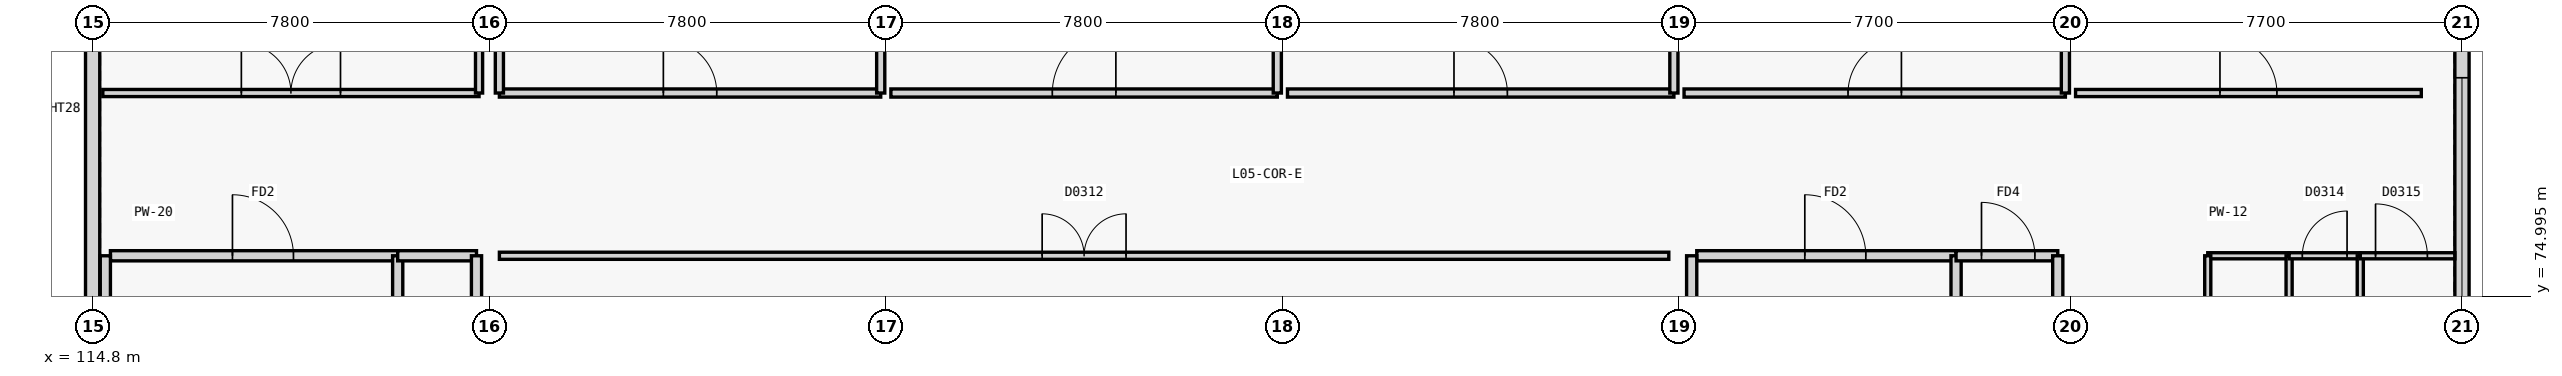
"""IFC4 building model, lengths in metres.
Left out: names, types, materials, properties, quantities, classifications, styles, units other than length and angle.
Written with IfcOpenShell. Run it as: python <this file> out.ifc"""

import sys

from ifc_helpers import new_model, si_unit, direction, frame, frame_2d, origin, place, context, subcontext, project, spatial, rectangle, extrude, element, fill, save


model = new_model("IFC4")
c1 = context("Model", 3, precision=1e-05, world=origin(), true_north=direction((0.0, 1.0)))
c2 = subcontext(c1, "Body", "Model", "MODEL_VIEW")
j1 = project(units=[si_unit("LENGTHUNIT", "METRE"), si_unit("PLANEANGLEUNIT", "RADIAN")], contexts=[c1])
p1 = place(None, origin())
s1 = spatial("IfcSite", under=j1, at=p1, CompositionType="ELEMENT")
p2 = place(p1, origin())
s2 = spatial("IfcBuilding", under=s1, at=p2, CompositionType="ELEMENT")
p3 = place(p2, frame((0.0, 0.0, 21.6)))
s3 = spatial("IfcBuildingStorey", under=s2, at=p3, CompositionType="ELEMENT", Elevation=21.6)
p4 = place(p3, frame((161.4, 96.777, 0.0), z_axis=(0.0, 0.0, 1.0), x_axis=(0.0, -1.0, 0.0)))
e1 = element("IfcWall", 1, at=p4, inside=s3, PredefinedType="SOLIDWALL", context=c2, shape_type="SweptSolid", body=[
    extrude(rectangle(XDim=32.554, YDim=0.28, at=frame_2d((16.277, 0.0))), origin(), (0.0, 0.0, 1.0), 1.98),
])
p5 = place(p4, frame((17.477, 0.0, 0.64)))
e2 = element("IfcOpeningElement", 2, at=p5, cuts=e1, PredefinedType="OPENING", context=c2, shape_type="SweptSolid", body=[
    extrude(rectangle(XDim=5.4, YDim=1.2, at=frame_2d((2.7, 0.6))), frame((0.0, 0.15, 0.0), z_axis=(0.0, -1.0, 0.0), x_axis=(1.0, 0.0, 0.0)), (0.0, 0.0, 1.0), 0.3),
])
p6 = place(p3, frame((114.8, 72.6, 0.0), z_axis=(0.0, 0.0, 1.0), x_axis=(0.0, 1.0, 0.0)))
e3 = element("IfcWall", 3, at=p6, inside=s3, PredefinedType="SOLIDWALL", context=c2, shape_type="SweptSolid", body=[
    extrude(rectangle(XDim=12.2, YDim=0.28, at=frame_2d((6.1, 0.0))), origin(), (0.0, 0.0, 1.0), 2.78),
])
p7 = place(p3, frame((115.15, 75.8, 0.0), z_axis=(0.0, 0.0, 1.0), x_axis=(1.0, 0.0, 0.0)))
e4 = element("IfcWall", 4, at=p7, inside=s3, PredefinedType="PARTITIONING", context=c2, shape_type="SweptSolid", body=[
    extrude(rectangle(XDim=5.65, YDim=0.2, at=frame_2d((2.825, 0.0))), origin(), (0.0, 0.0, 1.0), 3.32),
])
p8 = place(p7, frame((2.4, 0.0, 0.0)))
e5 = element("IfcOpeningElement", 5, at=p8, cuts=e4, PredefinedType="OPENING", context=c2, shape_type="SweptSolid", body=[
    extrude(rectangle(XDim=1.2, YDim=2.2, at=frame_2d((0.6, 1.1))), frame((0.0, 0.11, 0.0), z_axis=(0.0, -1.0, 0.0), x_axis=(1.0, 0.0, 0.0)), (0.0, 0.0, 1.0), 0.22),
])
p9 = place(p3, frame((115.05, 72.4, 0.0), z_axis=(0.0, 0.0, 1.0), x_axis=(0.0, 1.0, 0.0)))
e6 = element("IfcWall", 6, at=p9, inside=s3, PredefinedType="PARTITIONING", context=c2, shape_type="SweptSolid", body=[
    extrude(rectangle(XDim=3.4, YDim=0.2, at=frame_2d((1.7, 0.0))), origin(), (0.0, 0.0, 1.0), 2.78),
])
p10 = place(p3, frame((120.8, 72.4, 0.0), z_axis=(0.0, 0.0, 1.0), x_axis=(0.0, 1.0, 0.0)))
e7 = element("IfcWall", 7, at=p10, inside=s3, PredefinedType="PARTITIONING", context=c2, shape_type="SweptSolid", body=[
    extrude(rectangle(XDim=3.4, YDim=0.2, at=frame_2d((1.7, 0.0))), origin(), (0.0, 0.0, 1.0), 3.32),
])
p11 = place(p10, frame((1.1, 0.0, 0.0)))
e8 = element("IfcOpeningElement", 8, at=p11, cuts=e7, PredefinedType="OPENING", context=c2, shape_type="SweptSolid", body=[
    extrude(rectangle(XDim=1.2, YDim=2.2, at=frame_2d((0.6, 1.1))), frame((0.0, 0.11, 0.0), z_axis=(0.0, -1.0, 0.0), x_axis=(1.0, 0.0, 0.0)), (0.0, 0.0, 1.0), 0.22),
])
p12 = place(p3, frame((120.8, 75.8, 0.0), z_axis=(0.0, 0.0, 1.0), x_axis=(1.0, 0.0, 0.0)))
e9 = element("IfcWall", 9, at=p12, inside=s3, PredefinedType="PARTITIONING", context=c2, shape_type="SweptSolid", body=[
    extrude(rectangle(XDim=1.55, YDim=0.2, at=frame_2d((0.775, 0.0))), origin(), (0.0, 0.0, 1.0), 3.32),
])
p13 = place(p3, frame((122.35, 72.4, 0.0), z_axis=(0.0, 0.0, 1.0), x_axis=(0.0, 1.0, 0.0)))
e10 = element("IfcWall", 10, at=p13, inside=s3, PredefinedType="PARTITIONING", context=c2, shape_type="SweptSolid", body=[
    extrude(rectangle(XDim=3.4, YDim=0.2, at=frame_2d((1.7, 0.0))), origin(), (0.0, 0.0, 1.0), 2.82),
])
p14 = place(p3, frame((146.35, 75.8, 0.0), z_axis=(0.0, 0.0, 1.0), x_axis=(1.0, 0.0, 0.0)))
e11 = element("IfcWall", 11, at=p14, inside=s3, PredefinedType="PARTITIONING", context=c2, shape_type="SweptSolid", body=[
    extrude(rectangle(XDim=5.1, YDim=0.2, at=frame_2d((2.55, 0.0))), origin(), (0.0, 0.0, 1.0), 3.32),
])
p15 = place(p14, frame((2.125, 0.0, 0.0)))
e12 = element("IfcOpeningElement", 12, at=p15, cuts=e11, PredefinedType="OPENING", context=c2, shape_type="SweptSolid", body=[
    extrude(rectangle(XDim=1.2, YDim=2.2, at=frame_2d((0.6, 1.1))), frame((0.0, 0.11, 0.0), z_axis=(0.0, -1.0, 0.0), x_axis=(1.0, 0.0, 0.0)), (0.0, 0.0, 1.0), 0.22),
])
p16 = place(p3, frame((146.25, 72.4, 0.0), z_axis=(0.0, 0.0, 1.0), x_axis=(0.0, 1.0, 0.0)))
e13 = element("IfcWall", 13, at=p16, inside=s3, PredefinedType="PARTITIONING", context=c2, shape_type="SweptSolid", body=[
    extrude(rectangle(XDim=3.4, YDim=0.2, at=frame_2d((1.7, 0.0))), origin(), (0.0, 0.0, 1.0), 2.82),
])
p17 = place(p3, frame((151.45, 72.4, 0.0), z_axis=(0.0, 0.0, 1.0), x_axis=(0.0, 1.0, 0.0)))
e14 = element("IfcWall", 14, at=p17, inside=s3, PredefinedType="PARTITIONING", context=c2, shape_type="SweptSolid", body=[
    extrude(rectangle(XDim=3.4, YDim=0.2, at=frame_2d((1.7, 0.0))), origin(), (0.0, 0.0, 1.0), 3.32),
])
p18 = place(p17, frame((1.1, 0.0, 0.0)))
e15 = element("IfcOpeningElement", 15, at=p18, cuts=e14, PredefinedType="OPENING", context=c2, shape_type="SweptSolid", body=[
    extrude(rectangle(XDim=1.2, YDim=2.2, at=frame_2d((0.6, 1.1))), frame((0.0, 0.11, 0.0), z_axis=(0.0, -1.0, 0.0), x_axis=(1.0, 0.0, 0.0)), (0.0, 0.0, 1.0), 0.22),
])
p19 = place(p3, frame((151.45, 75.8, 0.0), z_axis=(0.0, 0.0, 1.0), x_axis=(1.0, 0.0, 0.0)))
e16 = element("IfcWall", 16, at=p19, inside=s3, PredefinedType="PARTITIONING", context=c2, shape_type="SweptSolid", body=[
    extrude(rectangle(XDim=2.0, YDim=0.2, at=frame_2d((1.0, 0.0))), origin(), (0.0, 0.0, 1.0), 3.32),
])
p20 = place(p19, frame((0.5, 0.0, 0.0)))
e17 = element("IfcOpeningElement", 17, at=p20, cuts=e16, PredefinedType="OPENING", context=c2, shape_type="SweptSolid", body=[
    extrude(rectangle(XDim=1.05, YDim=2.15, at=frame_2d((0.525, 1.075))), frame((0.0, 0.11, 0.0), z_axis=(0.0, -1.0, 0.0), x_axis=(1.0, 0.0, 0.0)), (0.0, 0.0, 1.0), 0.22),
])
p21 = place(p3, frame((153.45, 72.4, 0.0), z_axis=(0.0, 0.0, 1.0), x_axis=(0.0, 1.0, 0.0)))
e18 = element("IfcWall", 18, at=p21, inside=s3, PredefinedType="PARTITIONING", context=c2, shape_type="SweptSolid", body=[
    extrude(rectangle(XDim=3.4, YDim=0.2, at=frame_2d((1.7, 0.0))), origin(), (0.0, 0.0, 1.0), 2.82),
])
p22 = place(p3, frame((115.0, 79.0, 0.0), z_axis=(0.0, 0.0, 1.0), x_axis=(1.0, 0.0, 0.0)))
e19 = element("IfcWall", 19, at=p22, inside=s3, PredefinedType="PARTITIONING", context=c2, shape_type="SweptSolid", body=[
    extrude(rectangle(XDim=7.4, YDim=0.14, at=frame_2d((3.7, 0.0))), origin(), (0.0, 0.0, 1.0), 3.34),
])
p23 = place(p22, frame((2.725, 0.0, 0.0)))
e20 = element("IfcOpeningElement", 20, at=p23, cuts=e19, PredefinedType="OPENING", context=c2, shape_type="SweptSolid", body=[
    extrude(rectangle(XDim=1.95, YDim=2.35, at=frame_2d((0.975, 1.175))), frame((0.0, 0.08, 0.0), z_axis=(0.0, -1.0, 0.0), x_axis=(1.0, 0.0, 0.0)), (0.0, 0.0, 1.0), 0.16),
])
p24 = place(p3, frame((122.4, 79.0, 0.0), z_axis=(0.0, 0.0, 1.0), x_axis=(0.0, 1.0, 0.0)))
e21 = element("IfcWall", 21, at=p24, inside=s3, PredefinedType="PARTITIONING", context=c2, shape_type="SweptSolid", body=[
    extrude(rectangle(XDim=5.4, YDim=0.14, at=frame_2d((2.7, 0.0))), origin(), (0.0, 0.0, 1.0), 1.98),
])
p25 = place(p3, frame((122.8, 75.8, 0.0), z_axis=(0.0, 0.0, 1.0), x_axis=(1.0, 0.0, 0.0)))
e22 = element("IfcWall", 22, at=p25, inside=s3, PredefinedType="PARTITIONING", context=c2, shape_type="SweptSolid", body=[
    extrude(rectangle(XDim=23.0, YDim=0.14, at=frame_2d((11.5, 0.0))), origin(), (0.0, 0.0, 1.0), 3.34),
])
p26 = place(p25, frame((10.675, 0.0, 0.0)))
e23 = element("IfcOpeningElement", 23, at=p26, cuts=e22, PredefinedType="OPENING", context=c2, shape_type="SweptSolid", body=[
    extrude(rectangle(XDim=1.65, YDim=2.3, at=frame_2d((0.825, 1.15))), frame((0.0, 0.08, 0.0), z_axis=(0.0, -1.0, 0.0), x_axis=(1.0, 0.0, 0.0)), (0.0, 0.0, 1.0), 0.16),
])
p27 = place(p3, frame((156.4, 75.8, 0.0), z_axis=(0.0, 0.0, 1.0), x_axis=(1.0, 0.0, 0.0)))
e24 = element("IfcWall", 24, at=p27, inside=s3, PredefinedType="PARTITIONING", context=c2, shape_type="SweptSolid", body=[
    extrude(rectangle(XDim=1.6, YDim=0.12, at=frame_2d((0.8, 0.0))), origin(), (0.0, 0.0, 1.0), 3.34),
])
p28 = place(p3, frame((156.4, 70.6, 0.0), z_axis=(0.0, 0.0, 1.0), x_axis=(0.0, 1.0, 0.0)))
e25 = element("IfcWall", 25, at=p28, inside=s3, PredefinedType="PARTITIONING", context=c2, shape_type="SweptSolid", body=[
    extrude(rectangle(XDim=5.2, YDim=0.12, at=frame_2d((2.6, 0.0))), origin(), (0.0, 0.0, 1.0), 3.34),
])
p29 = place(p28, frame((2.16, 0.0, 0.0)))
e26 = element("IfcOpeningElement", 26, at=p29, cuts=e25, PredefinedType="OPENING", context=c2, shape_type="SweptSolid", body=[
    extrude(rectangle(XDim=0.88, YDim=2.1, at=frame_2d((0.44, 1.05))), frame((0.0, 0.07, 0.0), z_axis=(0.0, -1.0, 0.0), x_axis=(1.0, 0.0, 0.0)), (0.0, 0.0, 1.0), 0.14),
])
p30 = place(p3, frame((158.0, 70.6, 0.0), z_axis=(0.0, 0.0, 1.0), x_axis=(0.0, 1.0, 0.0)))
e27 = element("IfcWall", 27, at=p30, inside=s3, PredefinedType="PARTITIONING", context=c2, shape_type="SweptSolid", body=[
    extrude(rectangle(XDim=5.2, YDim=0.12, at=frame_2d((2.6, 0.0))), origin(), (0.0, 0.0, 1.0), 3.34),
])
p31 = place(p3, frame((158.0, 75.8, 0.0), z_axis=(0.0, 0.0, 1.0), x_axis=(1.0, 0.0, 0.0)))
e28 = element("IfcWall", 28, at=p31, inside=s3, PredefinedType="PARTITIONING", context=c2, shape_type="SweptSolid", body=[
    extrude(rectangle(XDim=1.4, YDim=0.12, at=frame_2d((0.7, 0.0))), origin(), (0.0, 0.0, 1.0), 3.34),
])
p32 = place(p31, frame((0.26, 0.0, 0.0)))
e29 = element("IfcOpeningElement", 29, at=p32, cuts=e28, PredefinedType="OPENING", context=c2, shape_type="SweptSolid", body=[
    extrude(rectangle(XDim=0.88, YDim=2.1, at=frame_2d((0.44, 1.05))), frame((0.0, 0.07, 0.0), z_axis=(0.0, -1.0, 0.0), x_axis=(1.0, 0.0, 0.0)), (0.0, 0.0, 1.0), 0.14),
])
p33 = place(p3, frame((159.4, 70.6, 0.0), z_axis=(0.0, 0.0, 1.0), x_axis=(0.0, 1.0, 0.0)))
e30 = element("IfcWall", 30, at=p33, inside=s3, PredefinedType="PARTITIONING", context=c2, shape_type="SweptSolid", body=[
    extrude(rectangle(XDim=5.2, YDim=0.12, at=frame_2d((2.6, 0.0))), origin(), (0.0, 0.0, 1.0), 3.34),
])
p34 = place(p3, frame((159.4, 75.8, 0.0), z_axis=(0.0, 0.0, 1.0), x_axis=(1.0, 0.0, 0.0)))
e31 = element("IfcWall", 31, at=p34, inside=s3, PredefinedType="PARTITIONING", context=c2, shape_type="SweptSolid", body=[
    extrude(rectangle(XDim=1.86, YDim=0.12, at=frame_2d((0.93, 0.0))), origin(), (0.0, 0.0, 1.0), 3.34),
])
p35 = place(p34, frame((0.3, 0.0, 0.0)))
e32 = element("IfcOpeningElement", 32, at=p35, cuts=e31, PredefinedType="OPENING", context=c2, shape_type="SweptSolid", body=[
    extrude(rectangle(XDim=1.02, YDim=2.1, at=frame_2d((0.51, 1.05))), frame((0.0, 0.07, 0.0), z_axis=(0.0, -1.0, 0.0), x_axis=(1.0, 0.0, 0.0)), (0.0, 0.0, 1.0), 0.14),
])
p36 = place(p3, frame((122.8, 79.0, 0.0), z_axis=(0.0, 0.0, 1.0), x_axis=(1.0, 0.0, 0.0)))
e33 = element("IfcWall", 33, at=p36, inside=s3, PredefinedType="PARTITIONING", context=c2, shape_type="SweptSolid", body=[
    extrude(rectangle(XDim=7.5, YDim=0.16, at=frame_2d((3.75, 0.0))), origin(), (0.0, 0.0, 1.0), 3.34),
])
p37 = place(p36, frame((3.225, 0.0, 0.0)))
e34 = element("IfcOpeningElement", 34, at=p37, cuts=e33, PredefinedType="OPENING", context=c2, shape_type="SweptSolid", body=[
    extrude(rectangle(XDim=1.05, YDim=2.15, at=frame_2d((0.525, 1.075))), frame((0.0, 0.09, 0.0), z_axis=(0.0, -1.0, 0.0), x_axis=(1.0, 0.0, 0.0)), (0.0, 0.0, 1.0), 0.18),
])
for number, where, z_axis, x_axis in (
    (35, (122.8, 79.0, 0.0), (0.0, 0.0, 1.0), (0.0, 1.0, 0.0)),
    (36, (130.3, 79.0, 0.0), (0.0, 0.0, 1.0), (0.0, 1.0, 0.0)),
):
    element("IfcWall", number, at=place(p3, frame(where, z_axis=z_axis, x_axis=x_axis)), inside=s3, PredefinedType="PARTITIONING", context=c2, shape_type="SweptSolid", body=[
        extrude(rectangle(XDim=17.6, YDim=0.16, at=frame_2d((8.8, 0.0))), origin(), (0.0, 0.0, 1.0), 1.98),
    ])
p38 = place(p3, frame((130.5, 79.0, 0.0), z_axis=(0.0, 0.0, 1.0), x_axis=(1.0, 0.0, 0.0)))
e37 = element("IfcWall", 37, at=p38, inside=s3, PredefinedType="PARTITIONING", context=c2, shape_type="SweptSolid", body=[
    extrude(rectangle(XDim=7.6, YDim=0.16, at=frame_2d((3.8, 0.0))), origin(), (0.0, 0.0, 1.0), 3.34),
])
p39 = place(p38, frame((3.175, 0.0, 0.0)))
e38 = element("IfcOpeningElement", 38, at=p39, cuts=e37, PredefinedType="OPENING", context=c2, shape_type="SweptSolid", body=[
    extrude(rectangle(XDim=1.25, YDim=2.2, at=frame_2d((0.625, 1.1))), frame((0.0, 0.09, 0.0), z_axis=(0.0, -1.0, 0.0), x_axis=(1.0, 0.0, 0.0)), (0.0, 0.0, 1.0), 0.18),
])
p40 = place(p3, frame((138.1, 79.0, 0.0), z_axis=(0.0, 0.0, 1.0), x_axis=(0.0, 1.0, 0.0)))
e39 = element("IfcWall", 39, at=p40, inside=s3, PredefinedType="PARTITIONING", context=c2, shape_type="SweptSolid", body=[
    extrude(rectangle(XDim=17.6, YDim=0.16, at=frame_2d((8.8, 0.0))), origin(), (0.0, 0.0, 1.0), 1.98),
])
p41 = place(p3, frame((138.3, 79.0, 0.0), z_axis=(0.0, 0.0, 1.0), x_axis=(1.0, 0.0, 0.0)))
e40 = element("IfcWall", 40, at=p41, inside=s3, PredefinedType="PARTITIONING", context=c2, shape_type="SweptSolid", body=[
    extrude(rectangle(XDim=7.6, YDim=0.16, at=frame_2d((3.8, 0.0))), origin(), (0.0, 0.0, 1.0), 3.34),
])
p42 = place(p41, frame((3.275, 0.0, 0.0)))
e41 = element("IfcOpeningElement", 41, at=p42, cuts=e40, PredefinedType="OPENING", context=c2, shape_type="SweptSolid", body=[
    extrude(rectangle(XDim=1.05, YDim=2.15, at=frame_2d((0.525, 1.075))), frame((0.0, 0.09, 0.0), z_axis=(0.0, -1.0, 0.0), x_axis=(1.0, 0.0, 0.0)), (0.0, 0.0, 1.0), 0.18),
])
p43 = place(p3, frame((145.9, 79.0, 0.0), z_axis=(0.0, 0.0, 1.0), x_axis=(0.0, 1.0, 0.0)))
e42 = element("IfcWall", 42, at=p43, inside=s3, PredefinedType="PARTITIONING", context=c2, shape_type="SweptSolid", body=[
    extrude(rectangle(XDim=17.6, YDim=0.16, at=frame_2d((8.8, 0.0))), origin(), (0.0, 0.0, 1.0), 1.98),
])
p44 = place(p3, frame((146.1, 79.0, 0.0), z_axis=(0.0, 0.0, 1.0), x_axis=(1.0, 0.0, 0.0)))
e43 = element("IfcWall", 43, at=p44, inside=s3, PredefinedType="PARTITIONING", context=c2, shape_type="SweptSolid", body=[
    extrude(rectangle(XDim=7.5, YDim=0.16, at=frame_2d((3.75, 0.0))), origin(), (0.0, 0.0, 1.0), 3.34),
])
p45 = place(p44, frame((3.225, 0.0, 0.0)))
e44 = element("IfcOpeningElement", 44, at=p45, cuts=e43, PredefinedType="OPENING", context=c2, shape_type="SweptSolid", body=[
    extrude(rectangle(XDim=1.05, YDim=2.15, at=frame_2d((0.525, 1.075))), frame((0.0, 0.09, 0.0), z_axis=(0.0, -1.0, 0.0), x_axis=(1.0, 0.0, 0.0)), (0.0, 0.0, 1.0), 0.18),
])
p46 = place(p3, frame((153.6, 79.0, 0.0), z_axis=(0.0, 0.0, 1.0), x_axis=(0.0, 1.0, 0.0)))
e45 = element("IfcWall", 45, at=p46, inside=s3, PredefinedType="PARTITIONING", context=c2, shape_type="SweptSolid", body=[
    extrude(rectangle(XDim=17.6, YDim=0.16, at=frame_2d((8.8, 0.0))), origin(), (0.0, 0.0, 1.0), 1.98),
])
p47 = place(p3, frame((153.8, 79.0, 0.0), z_axis=(0.0, 0.0, 1.0), x_axis=(1.0, 0.0, 0.0)))
e46 = element("IfcWall", 46, at=p47, inside=s3, PredefinedType="PARTITIONING", context=c2, shape_type="SweptSolid", body=[
    extrude(rectangle(XDim=6.8, YDim=0.14, at=frame_2d((3.4, 0.0))), origin(), (0.0, 0.0, 1.0), 3.34),
])
p48 = place(p47, frame((2.84, 0.0, 0.0)))
e47 = element("IfcOpeningElement", 47, at=p48, cuts=e46, PredefinedType="OPENING", context=c2, shape_type="SweptSolid", body=[
    extrude(rectangle(XDim=1.12, YDim=2.15, at=frame_2d((0.56, 1.075))), frame((0.0, 0.08, 0.0), z_axis=(0.0, -1.0, 0.0), x_axis=(1.0, 0.0, 0.0)), (0.0, 0.0, 1.0), 0.16),
])
p49 = place(p5, origin())
e48 = element("IfcWindow", 48, at=p49, inside=s3, PartitioningType="SINGLE_PANEL", PredefinedType="WINDOW", context=c2, shape_type="SweptSolid", body=[
    extrude(rectangle(XDim=5.4, YDim=1.2, at=frame_2d((2.7, 0.6))), frame((0.0, 0.03, 0.0), z_axis=(0.0, -1.0, 0.0), x_axis=(1.0, 0.0, 0.0)), (0.0, 0.0, 1.0), 0.06),
])
fill(e2, e48)
p50 = place(p8, origin())
e49 = element("IfcDoor", 49, at=p50, inside=s3, OperationType="SINGLE_SWING_LEFT", PredefinedType="DOOR", context=c2, shape_type="SweptSolid", body=[
    extrude(rectangle(XDim=1.2, YDim=2.2, at=frame_2d((0.6, 1.1))), frame((0.0, 0.025, 0.0), z_axis=(0.0, -1.0, 0.0), x_axis=(1.0, 0.0, 0.0)), (0.0, 0.0, 1.0), 0.05),
])
fill(e5, e49)
p51 = place(p15, origin())
e50 = element("IfcDoor", 50, at=p51, inside=s3, OperationType="SINGLE_SWING_LEFT", PredefinedType="DOOR", context=c2, shape_type="SweptSolid", body=[
    extrude(rectangle(XDim=1.2, YDim=2.2, at=frame_2d((0.6, 1.1))), frame((0.0, 0.025, 0.0), z_axis=(0.0, -1.0, 0.0), x_axis=(1.0, 0.0, 0.0)), (0.0, 0.0, 1.0), 0.05),
])
fill(e12, e50)
p52 = place(p20, origin())
e51 = element("IfcDoor", 51, at=p52, inside=s3, OperationType="SINGLE_SWING_LEFT", PredefinedType="DOOR", context=c2, shape_type="SweptSolid", body=[
    extrude(rectangle(XDim=1.05, YDim=2.15, at=frame_2d((0.525, 1.075))), frame((0.0, 0.025, 0.0), z_axis=(0.0, -1.0, 0.0), x_axis=(1.0, 0.0, 0.0)), (0.0, 0.0, 1.0), 0.05),
])
fill(e17, e51)
p53 = place(p23, origin())
e52 = element("IfcDoor", 52, at=p53, inside=s3, OperationType="DOUBLE_DOOR_SINGLE_SWING", PredefinedType="DOOR", context=c2, shape_type="SweptSolid", body=[
    extrude(rectangle(XDim=1.95, YDim=2.35, at=frame_2d((0.975, 1.175))), frame((0.0, 0.025, 0.0), z_axis=(0.0, -1.0, 0.0), x_axis=(1.0, 0.0, 0.0)), (0.0, 0.0, 1.0), 0.05),
])
fill(e20, e52)
p54 = place(p26, origin())
e53 = element("IfcDoor", 53, at=p54, inside=s3, OperationType="DOUBLE_DOOR_SINGLE_SWING", PredefinedType="DOOR", context=c2, shape_type="SweptSolid", body=[
    extrude(rectangle(XDim=1.65, YDim=2.3, at=frame_2d((0.825, 1.15))), frame((0.0, 0.025, 0.0), z_axis=(0.0, -1.0, 0.0), x_axis=(1.0, 0.0, 0.0)), (0.0, 0.0, 1.0), 0.05),
])
fill(e23, e53)
p55 = place(p32, origin())
e54 = element("IfcDoor", 54, at=p55, inside=s3, OperationType="SINGLE_SWING_RIGHT", PredefinedType="DOOR", context=c2, shape_type="SweptSolid", body=[
    extrude(rectangle(XDim=0.88, YDim=2.1, at=frame_2d((0.44, 1.05))), frame((0.0, 0.025, 0.0), z_axis=(0.0, -1.0, 0.0), x_axis=(1.0, 0.0, 0.0)), (0.0, 0.0, 1.0), 0.05),
])
fill(e29, e54)
p56 = place(p35, origin())
e55 = element("IfcDoor", 55, at=p56, inside=s3, OperationType="SINGLE_SWING_LEFT", PredefinedType="DOOR", context=c2, shape_type="SweptSolid", body=[
    extrude(rectangle(XDim=1.02, YDim=2.1, at=frame_2d((0.51, 1.05))), frame((0.0, 0.025, 0.0), z_axis=(0.0, -1.0, 0.0), x_axis=(1.0, 0.0, 0.0)), (0.0, 0.0, 1.0), 0.05),
])
fill(e32, e55)
p57 = place(p37, origin())
e56 = element("IfcDoor", 56, at=p57, inside=s3, OperationType="SINGLE_SWING_LEFT", PredefinedType="DOOR", context=c2, shape_type="SweptSolid", body=[
    extrude(rectangle(XDim=1.05, YDim=2.15, at=frame_2d((0.525, 1.075))), frame((0.0, 0.025, 0.0), z_axis=(0.0, -1.0, 0.0), x_axis=(1.0, 0.0, 0.0)), (0.0, 0.0, 1.0), 0.05),
])
fill(e34, e56)
p58 = place(p39, origin())
e57 = element("IfcDoor", 57, at=p58, inside=s3, OperationType="SINGLE_SWING_RIGHT", PredefinedType="DOOR", context=c2, shape_type="SweptSolid", body=[
    extrude(rectangle(XDim=1.25, YDim=2.2, at=frame_2d((0.625, 1.1))), frame((0.0, 0.025, 0.0), z_axis=(0.0, -1.0, 0.0), x_axis=(1.0, 0.0, 0.0)), (0.0, 0.0, 1.0), 0.05),
])
fill(e38, e57)
p59 = place(p42, origin())
e58 = element("IfcDoor", 58, at=p59, inside=s3, OperationType="SINGLE_SWING_LEFT", PredefinedType="DOOR", context=c2, shape_type="SweptSolid", body=[
    extrude(rectangle(XDim=1.05, YDim=2.15, at=frame_2d((0.525, 1.075))), frame((0.0, 0.025, 0.0), z_axis=(0.0, -1.0, 0.0), x_axis=(1.0, 0.0, 0.0)), (0.0, 0.0, 1.0), 0.05),
])
fill(e41, e58)
p60 = place(p45, origin())
e59 = element("IfcDoor", 59, at=p60, inside=s3, OperationType="SINGLE_SWING_RIGHT", PredefinedType="DOOR", context=c2, shape_type="SweptSolid", body=[
    extrude(rectangle(XDim=1.05, YDim=2.15, at=frame_2d((0.525, 1.075))), frame((0.0, 0.025, 0.0), z_axis=(0.0, -1.0, 0.0), x_axis=(1.0, 0.0, 0.0)), (0.0, 0.0, 1.0), 0.05),
])
fill(e44, e59)
p61 = place(p48, origin())
e60 = element("IfcDoor", 60, at=p61, inside=s3, OperationType="SINGLE_SWING_LEFT", PredefinedType="DOOR", context=c2, shape_type="SweptSolid", body=[
    extrude(rectangle(XDim=1.12, YDim=2.15, at=frame_2d((0.56, 1.075))), frame((0.0, 0.025, 0.0), z_axis=(0.0, -1.0, 0.0), x_axis=(1.0, 0.0, 0.0)), (0.0, 0.0, 1.0), 0.05),
])
fill(e47, e60)
save(model, sys.argv[1])
